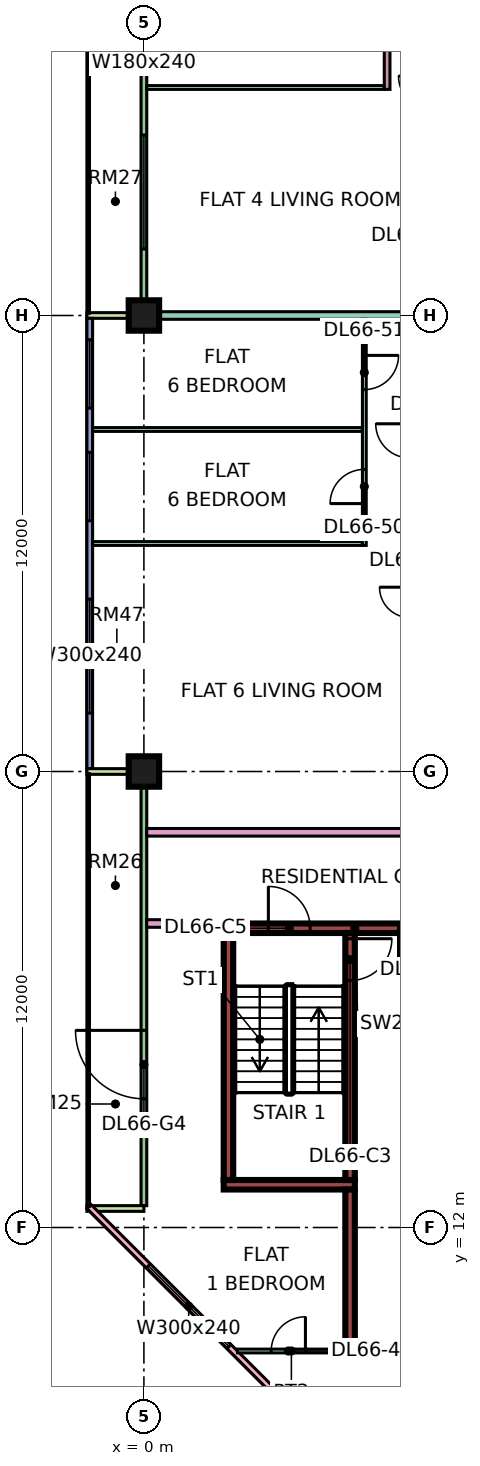
"""IFC4 building model, lengths in metres.
Left out: names, types, materials, properties, quantities, classifications, styles, units other than length and angle.
Written with IfcOpenShell. Run it as: python <this file> out.ifc"""

import sys

from ifc_helpers import new_model, si_unit, direction, frame, frame_2d, origin, origin_2d, place, context, subcontext, project, spatial, rectangle, extrude, element, fill, save


model = new_model("IFC4")
c1 = context("Model", 3, precision=1e-05, world=origin(), true_north=direction((0.0, 1.0)))
c2 = subcontext(c1, "Body", "Model", "MODEL_VIEW")
j1 = project(units=[si_unit("LENGTHUNIT", "METRE"), si_unit("PLANEANGLEUNIT", "RADIAN")], contexts=[c1])
p1 = place(None, origin())
s1 = spatial("IfcSite", under=j1, at=p1, CompositionType="ELEMENT")
p2 = place(p1, origin())
s2 = spatial("IfcBuilding", under=s1, at=p2, CompositionType="ELEMENT")
p3 = place(p2, frame((0.0, 0.0, 284.65)))
s3 = spatial("IfcBuildingStorey", under=s2, at=p3, CompositionType="ELEMENT", Elevation=284.65)
p4 = place(p3, frame((0.0, 24.0, 0.0), z_axis=(0.0, 0.0, 1.0), x_axis=(1.0, 0.0, 0.0)))
e1 = element("IfcColumn", 1, at=p4, inside=s3, PredefinedType="COLUMN", context=c2, shape_type="SweptSolid", body=[
    extrude(rectangle(XDim=0.8, YDim=0.8, at=origin_2d()), origin(), (0.0, 0.0, 1.0), 3.75),
])
p5 = place(p3, frame((0.0, 36.0, 0.0), z_axis=(0.0, 0.0, 1.0), x_axis=(1.0, 0.0, 0.0)))
e2 = element("IfcColumn", 2, at=p5, inside=s3, PredefinedType="COLUMN", context=c2, shape_type="SweptSolid", body=[
    extrude(rectangle(XDim=0.8, YDim=0.8, at=origin_2d()), origin(), (0.0, 0.0, 1.0), 3.75),
])
p6 = place(p3, frame((2.1, 19.875, 0.0), z_axis=(0.0, 0.0, 1.0), x_axis=(1.0, 0.0, 0.0)))
e3 = element("IfcWall", 3, at=p6, inside=s3, PredefinedType="SHEAR", context=c2, shape_type="SweptSolid", body=[
    extrude(rectangle(XDim=6.9, YDim=0.25, at=frame_2d((3.45, 0.0))), origin(), (0.0, 0.0, 1.0), 3.75),
])
p7 = place(p6, frame((1.175, 0.0, 0.0)))
e4 = element("IfcOpeningElement", 4, at=p7, cuts=e3, PredefinedType="OPENING", context=c2, shape_type="SweptSolid", body=[
    extrude(rectangle(XDim=1.1, YDim=2.2, at=frame_2d((0.55, 1.1))), frame((0.0, 0.135, 0.0), z_axis=(0.0, -1.0, 0.0), x_axis=(1.0, 0.0, 0.0)), (0.0, 0.0, 1.0), 0.27),
])
p8 = place(p6, frame((4.6, 0.0, 0.0)))
e5 = element("IfcOpeningElement", 5, at=p8, cuts=e3, PredefinedType="OPENING", context=c2, shape_type="SweptSolid", body=[
    extrude(rectangle(XDim=1.2, YDim=2.2, at=frame_2d((0.6, 1.1))), frame((0.0, 0.135, 0.0), z_axis=(0.0, -1.0, 0.0), x_axis=(1.0, 0.0, 0.0)), (0.0, 0.0, 1.0), 0.27),
])
p9 = place(p3, frame((2.1, 13.125, 0.0), z_axis=(0.0, 0.0, 1.0), x_axis=(1.0, 0.0, 0.0)))
e6 = element("IfcWall", 6, at=p9, inside=s3, PredefinedType="SHEAR", context=c2, shape_type="SweptSolid", body=[
    extrude(rectangle(XDim=3.45, YDim=0.25, at=frame_2d((1.725, 0.0))), origin(), (0.0, 0.0, 1.0), 3.75),
])
p10 = place(p3, frame((2.225, 13.25, 0.0), z_axis=(0.0, 0.0, 1.0), x_axis=(0.0, 1.0, 0.0)))
e7 = element("IfcWall", 7, at=p10, inside=s3, PredefinedType="SHEAR", context=c2, shape_type="SweptSolid", body=[
    extrude(rectangle(XDim=6.5, YDim=0.25, at=frame_2d((3.25, 0.0))), origin(), (0.0, 0.0, 1.0), 3.75),
])
p11 = place(p3, frame((5.425, 13.25, 0.0), z_axis=(0.0, 0.0, 1.0), x_axis=(0.0, 1.0, 0.0)))
e8 = element("IfcWall", 8, at=p11, inside=s3, PredefinedType="SHEAR", context=c2, shape_type="SweptSolid", body=[
    extrude(rectangle(XDim=6.5, YDim=0.25, at=frame_2d((3.25, 0.0))), origin(), (0.0, 0.0, 1.0), 3.75),
])
p12 = place(p11, frame((5.25, 0.0, 0.0)))
e9 = element("IfcOpeningElement", 9, at=p12, cuts=e8, PredefinedType="OPENING", context=c2, shape_type="SweptSolid", body=[
    extrude(rectangle(XDim=1.1, YDim=2.2, at=frame_2d((0.55, 1.1))), frame((0.0, 0.135, 0.0), z_axis=(0.0, -1.0, 0.0), x_axis=(1.0, 0.0, 0.0)), (0.0, 0.0, 1.0), 0.27),
])
p13 = place(p3, frame((5.3, 8.875, 0.0), z_axis=(0.0, 0.0, 1.0), x_axis=(1.0, 0.0, 0.0)))
e10 = element("IfcWall", 10, at=p13, inside=s3, PredefinedType="SHEAR", context=c2, shape_type="SweptSolid", body=[
    extrude(rectangle(XDim=3.7, YDim=0.25, at=frame_2d((1.85, 0.0))), origin(), (0.0, 0.0, 1.0), 3.75),
])
p14 = place(p3, frame((5.425, 9.0, 0.0), z_axis=(0.0, 0.0, 1.0), x_axis=(0.0, 1.0, 0.0)))
e11 = element("IfcWall", 11, at=p14, inside=s3, PredefinedType="SHEAR", context=c2, shape_type="SweptSolid", body=[
    extrude(rectangle(XDim=4.0, YDim=0.25, at=frame_2d((2.0, 0.0))), origin(), (0.0, 0.0, 1.0), 3.75),
])
p15 = place(p3, frame((0.0, 47.925, 0.0), z_axis=(0.0, 0.0, 1.0), x_axis=(0.0, -1.0, 0.0)))
e12 = element("IfcWall", 12, at=p15, inside=s3, PredefinedType="SOLIDWALL", context=c2, shape_type="SweptSolid", body=[
    extrude(rectangle(XDim=11.85, YDim=0.15, at=frame_2d((5.925, 0.0))), origin(), (0.0, 0.0, 1.0), 3.35),
])
p16 = place(p15, frame((0.613, 0.0, 0.0)))
e13 = element("IfcOpeningElement", 13, at=p16, cuts=e12, PredefinedType="OPENING", context=c2, shape_type="SweptSolid", body=[
    extrude(rectangle(XDim=1.2, YDim=2.4, at=frame_2d((0.6, 1.2))), frame((0.0, 0.085, 0.0), z_axis=(0.0, -1.0, 0.0), x_axis=(1.0, 0.0, 0.0)), (0.0, 0.0, 1.0), 0.17),
])
p17 = place(p15, frame((3.775, 0.0, 0.45)))
e14 = element("IfcOpeningElement", 14, at=p17, cuts=e12, PredefinedType="OPENING", context=c2, shape_type="SweptSolid", body=[
    extrude(rectangle(XDim=1.8, YDim=2.4, at=frame_2d((0.9, 1.2))), frame((0.0, 0.085, 0.0), z_axis=(0.0, -1.0, 0.0), x_axis=(1.0, 0.0, 0.0)), (0.0, 0.0, 1.0), 0.17),
])
p18 = place(p15, frame((7.175, 0.0, 0.45)))
e15 = element("IfcOpeningElement", 15, at=p18, cuts=e12, PredefinedType="OPENING", context=c2, shape_type="SweptSolid", body=[
    extrude(rectangle(XDim=3.0, YDim=2.4, at=frame_2d((1.5, 1.2))), frame((0.0, 0.085, 0.0), z_axis=(0.0, -1.0, 0.0), x_axis=(1.0, 0.0, 0.0)), (0.0, 0.0, 1.0), 0.17),
])
p19 = place(p3, frame((-1.5, 36.0, 0.0), z_axis=(0.0, 0.0, 1.0), x_axis=(1.0, 0.0, 0.0)))
e16 = element("IfcWall", 16, at=p19, inside=s3, PredefinedType="SOLIDWALL", context=c2, shape_type="SweptSolid", body=[
    extrude(rectangle(XDim=1.5, YDim=0.15, at=frame_2d((0.75, 0.0))), origin(), (0.0, 0.0, 1.0), 3.35),
])
p20 = place(p3, frame((-1.425, 35.925, 0.0), z_axis=(0.0, 0.0, 1.0), x_axis=(0.0, -1.0, 0.0)))
e17 = element("IfcWall", 17, at=p20, inside=s3, PredefinedType="SOLIDWALL", context=c2, shape_type="SweptSolid", body=[
    extrude(rectangle(XDim=11.85, YDim=0.15, at=frame_2d((5.925, 0.0))), origin(), (0.0, 0.0, 1.0), 3.35),
])
p21 = place(p20, frame((0.562, 0.0, 0.45)))
e18 = element("IfcOpeningElement", 18, at=p21, cuts=e17, PredefinedType="OPENING", context=c2, shape_type="SweptSolid", body=[
    extrude(rectangle(XDim=1.8, YDim=2.4, at=frame_2d((0.9, 1.2))), frame((0.0, 0.085, 0.0), z_axis=(0.0, -1.0, 0.0), x_axis=(1.0, 0.0, 0.0)), (0.0, 0.0, 1.0), 0.17),
])
p22 = place(p20, frame((3.525, 0.0, 0.45)))
e19 = element("IfcOpeningElement", 19, at=p22, cuts=e17, PredefinedType="OPENING", context=c2, shape_type="SweptSolid", body=[
    extrude(rectangle(XDim=1.8, YDim=2.4, at=frame_2d((0.9, 1.2))), frame((0.0, 0.085, 0.0), z_axis=(0.0, -1.0, 0.0), x_axis=(1.0, 0.0, 0.0)), (0.0, 0.0, 1.0), 0.17),
])
p23 = place(p20, frame((7.387, 0.0, 0.45)))
e20 = element("IfcOpeningElement", 20, at=p23, cuts=e17, PredefinedType="OPENING", context=c2, shape_type="SweptSolid", body=[
    extrude(rectangle(XDim=3.0, YDim=2.4, at=frame_2d((1.5, 1.2))), frame((0.0, 0.085, 0.0), z_axis=(0.0, -1.0, 0.0), x_axis=(1.0, 0.0, 0.0)), (0.0, 0.0, 1.0), 0.17),
])
p24 = place(p3, frame((0.0, 23.925, 0.0), z_axis=(0.0, 0.0, 1.0), x_axis=(0.0, -1.0, 0.0)))
e21 = element("IfcWall", 21, at=p24, inside=s3, PredefinedType="SOLIDWALL", context=c2, shape_type="SweptSolid", body=[
    extrude(rectangle(XDim=11.35, YDim=0.15, at=frame_2d((5.675, 0.0))), origin(), (0.0, 0.0, 1.0), 3.35),
])
p25 = place(p24, frame((6.738, 0.0, 0.0)))
e22 = element("IfcOpeningElement", 22, at=p25, cuts=e21, PredefinedType="OPENING", context=c2, shape_type="SweptSolid", body=[
    extrude(rectangle(XDim=1.8, YDim=2.4, at=frame_2d((0.9, 1.2))), frame((0.0, 0.085, 0.0), z_axis=(0.0, -1.0, 0.0), x_axis=(1.0, 0.0, 0.0)), (0.0, 0.0, 1.0), 0.17),
])
for number, where, z_axis, x_axis in (
    (23, (-1.5, 24.0, 0.0), (0.0, 0.0, 1.0), (1.0, 0.0, 0.0)),
    (24, (-1.5, 12.5, 0.0), (0.0, 0.0, 1.0), (1.0, 0.0, 0.0)),
):
    element("IfcWall", number, at=place(p3, frame(where, z_axis=z_axis, x_axis=x_axis)), inside=s3, PredefinedType="SOLIDWALL", context=c2, shape_type="SweptSolid", body=[
        extrude(rectangle(XDim=1.5, YDim=0.15, at=frame_2d((0.75, 0.0))), origin(), (0.0, 0.0, 1.0), 3.35),
    ])
p26 = place(p3, frame((-1.447, 12.553, 0.0), z_axis=(0.0, 0.0, 1.0), x_axis=(0.707106781187, -0.707106781187, 0.0)))
e25 = element("IfcWall", 25, at=p26, inside=s3, PredefinedType="SOLIDWALL", context=c2, shape_type="SweptSolid", body=[
    extrude(rectangle(XDim=19.799, YDim=0.15, at=frame_2d((9.899, 0.0))), origin(), (0.0, 0.0, 1.0), 3.35),
])
p27 = place(p26, frame((2.212, 0.0, 0.45)))
e26 = element("IfcOpeningElement", 26, at=p27, cuts=e25, PredefinedType="OPENING", context=c2, shape_type="SweptSolid", body=[
    extrude(rectangle(XDim=3.0, YDim=2.4, at=frame_2d((1.5, 1.2))), frame((0.0, 0.085, 0.0), z_axis=(0.0, -1.0, 0.0), x_axis=(1.0, 0.0, 0.0)), (0.0, 0.0, 1.0), 0.17),
])
p28 = place(p26, frame((10.216, 0.0, 0.45)))
e27 = element("IfcOpeningElement", 27, at=p28, cuts=e25, PredefinedType="OPENING", context=c2, shape_type="SweptSolid", body=[
    extrude(rectangle(XDim=3.0, YDim=2.4, at=frame_2d((1.5, 1.2))), frame((0.0, 0.085, 0.0), z_axis=(0.0, -1.0, 0.0), x_axis=(1.0, 0.0, 0.0)), (0.0, 0.0, 1.0), 0.17),
])
p29 = place(p3, frame((-1.351, 33.0, 0.0), z_axis=(0.0, 0.0, 1.0), x_axis=(1.0, 0.0, 0.0)))
e28 = element("IfcWall", 28, at=p29, inside=s3, PredefinedType="PARTITIONING", context=c2, shape_type="SweptSolid", body=[
    extrude(rectangle(XDim=7.101, YDim=0.1, at=frame_2d((3.551, 0.0))), origin(), (0.0, 0.0, 1.0), 3.35),
])
p30 = place(p3, frame((-1.35, 30.0, 0.0), z_axis=(0.0, 0.0, 1.0), x_axis=(1.0, 0.0, 0.0)))
e29 = element("IfcWall", 29, at=p30, inside=s3, PredefinedType="PARTITIONING", context=c2, shape_type="SweptSolid", body=[
    extrude(rectangle(XDim=7.1, YDim=0.1, at=frame_2d((3.55, 0.0))), origin(), (0.0, 0.0, 1.0), 3.35),
])
e30 = element("IfcWall", 30, at=p5, inside=s3, PredefinedType="PARTITIONING", context=c2, shape_type="SweptSolid", body=[
    extrude(rectangle(XDim=12.3, YDim=0.2, at=frame_2d((6.15, 0.0))), origin(), (0.0, 0.0, 1.0), 3.35),
])
p31 = place(p3, frame((0.074, 20.0, 0.0), z_axis=(0.0, 0.0, 1.0), x_axis=(1.0, 0.0, 0.0)))
e31 = element("IfcWall", 31, at=p31, inside=s3, PredefinedType="PARTITIONING", context=c2, shape_type="SweptSolid", body=[
    extrude(rectangle(XDim=2.026, YDim=0.2, at=frame_2d((1.013, 0.0))), origin(), (0.0, 0.0, 1.0), 3.35),
])
p32 = place(p3, frame((0.074, 22.4, 0.0), z_axis=(0.0, 0.0, 1.0), x_axis=(1.0, 0.0, 0.0)))
e32 = element("IfcWall", 32, at=p32, inside=s3, PredefinedType="PARTITIONING", context=c2, shape_type="SweptSolid", body=[
    extrude(rectangle(XDim=12.226, YDim=0.2, at=frame_2d((6.113, 0.0))), origin(), (0.0, 0.0, 1.0), 3.35),
])
p33 = place(p3, frame((0.074, 42.0, 0.0), z_axis=(0.0, 0.0, 1.0), x_axis=(1.0, 0.0, 0.0)))
e33 = element("IfcWall", 33, at=p33, inside=s3, PredefinedType="PARTITIONING", context=c2, shape_type="SweptSolid", body=[
    extrude(rectangle(XDim=6.251, YDim=0.1, at=frame_2d((3.125, 0.0))), origin(), (0.0, 0.0, 1.0), 3.35),
])
p34 = place(p3, frame((2.461, 8.75, 0.0), z_axis=(0.0, 0.0, 1.0), x_axis=(1.0, 0.0, 0.0)))
e34 = element("IfcWall", 34, at=p34, inside=s3, PredefinedType="PARTITIONING", context=c2, shape_type="SweptSolid", body=[
    extrude(rectangle(XDim=2.839, YDim=0.1, at=frame_2d((1.419, 0.0))), origin(), (0.0, 0.0, 1.0), 3.35),
])
p35 = place(p34, frame((0.889, 0.0, 0.0)))
e35 = element("IfcOpeningElement", 35, at=p35, cuts=e34, PredefinedType="OPENING", context=c2, shape_type="SweptSolid", body=[
    extrude(rectangle(XDim=0.9, YDim=2.1, at=frame_2d((0.45, 1.05))), frame((0.0, 0.06, 0.0), z_axis=(0.0, -1.0, 0.0), x_axis=(1.0, 0.0, 0.0)), (0.0, 0.0, 1.0), 0.12),
])
p36 = place(p3, frame((5.8, 29.95, 0.0), z_axis=(0.0, 0.0, 1.0), x_axis=(0.0, 1.0, 0.0)))
e36 = element("IfcWall", 36, at=p36, inside=s3, PredefinedType="PARTITIONING", context=c2, shape_type="SweptSolid", body=[
    extrude(rectangle(XDim=5.95, YDim=0.1, at=frame_2d((2.975, 0.0))), origin(), (0.0, 0.0, 1.0), 3.35),
])
p37 = place(p36, frame((1.1, 0.0, 0.0)))
e37 = element("IfcOpeningElement", 37, at=p37, cuts=e36, PredefinedType="OPENING", context=c2, shape_type="SweptSolid", body=[
    extrude(rectangle(XDim=0.9, YDim=2.1, at=frame_2d((0.45, 1.05))), frame((0.0, 0.06, 0.0), z_axis=(0.0, -1.0, 0.0), x_axis=(1.0, 0.0, 0.0)), (0.0, 0.0, 1.0), 0.12),
])
p38 = place(p36, frame((4.1, 0.0, 0.0)))
e38 = element("IfcOpeningElement", 38, at=p38, cuts=e36, PredefinedType="OPENING", context=c2, shape_type="SweptSolid", body=[
    extrude(rectangle(XDim=0.9, YDim=2.1, at=frame_2d((0.45, 1.05))), frame((0.0, 0.06, 0.0), z_axis=(0.0, -1.0, 0.0), x_axis=(1.0, 0.0, 0.0)), (0.0, 0.0, 1.0), 0.12),
])
p39 = place(p3, frame((6.4, 41.95, 0.0), z_axis=(0.0, 0.0, 1.0), x_axis=(0.0, 1.0, 0.0)))
e39 = element("IfcWall", 39, at=p39, inside=s3, PredefinedType="PARTITIONING", context=c2, shape_type="SweptSolid", body=[
    extrude(rectangle(XDim=13.4, YDim=0.15, at=frame_2d((6.7, 0.0))), origin(), (0.0, 0.0, 1.0), 3.35),
])
p40 = place(p39, frame((1.1, 0.0, 0.0)))
e40 = element("IfcOpeningElement", 40, at=p40, cuts=e39, PredefinedType="OPENING", context=c2, shape_type="SweptSolid", body=[
    extrude(rectangle(XDim=0.9, YDim=2.1, at=frame_2d((0.45, 1.05))), frame((0.0, 0.085, 0.0), z_axis=(0.0, -1.0, 0.0), x_axis=(1.0, 0.0, 0.0)), (0.0, 0.0, 1.0), 0.17),
])
p41 = place(p39, frame((4.1, 0.0, 0.0)))
e41 = element("IfcOpeningElement", 41, at=p41, cuts=e39, PredefinedType="OPENING", context=c2, shape_type="SweptSolid", body=[
    extrude(rectangle(XDim=0.9, YDim=2.1, at=frame_2d((0.45, 1.05))), frame((0.0, 0.085, 0.0), z_axis=(0.0, -1.0, 0.0), x_axis=(1.0, 0.0, 0.0)), (0.0, 0.0, 1.0), 0.17),
])
p42 = place(p39, frame((10.95, 0.0, 0.0)))
e42 = element("IfcOpeningElement", 42, at=p42, cuts=e39, PredefinedType="OPENING", context=c2, shape_type="SweptSolid", body=[
    extrude(rectangle(XDim=0.8, YDim=2.1, at=frame_2d((0.4, 1.05))), frame((0.0, 0.085, 0.0), z_axis=(0.0, -1.0, 0.0), x_axis=(1.0, 0.0, 0.0)), (0.0, 0.0, 1.0), 0.17),
])
p43 = place(p39, frame((6.7, 0.0, 0.0)))
e43 = element("IfcOpeningElement", 43, at=p43, cuts=e39, PredefinedType="OPENING", context=c2, shape_type="SweptSolid", body=[
    extrude(rectangle(XDim=1.6, YDim=2.1, at=frame_2d((0.8, 1.05))), frame((0.0, 0.085, 0.0), z_axis=(0.0, -1.0, 0.0), x_axis=(1.0, 0.0, 0.0)), (0.0, 0.0, 1.0), 0.17),
])
p44 = place(p17, origin())
e44 = element("IfcWindow", 44, at=p44, inside=s3, PartitioningType="SINGLE_PANEL", PredefinedType="WINDOW", context=c2, shape_type="SweptSolid", body=[
    extrude(rectangle(XDim=1.8, YDim=2.4, at=frame_2d((0.9, 1.2))), frame((0.0, 0.03, 0.0), z_axis=(0.0, -1.0, 0.0), x_axis=(1.0, 0.0, 0.0)), (0.0, 0.0, 1.0), 0.06),
])
fill(e14, e44)
p45 = place(p18, origin())
e45 = element("IfcWindow", 45, at=p45, inside=s3, PartitioningType="SINGLE_PANEL", PredefinedType="WINDOW", context=c2, shape_type="SweptSolid", body=[
    extrude(rectangle(XDim=3.0, YDim=2.4, at=frame_2d((1.5, 1.2))), frame((0.0, 0.03, 0.0), z_axis=(0.0, -1.0, 0.0), x_axis=(1.0, 0.0, 0.0)), (0.0, 0.0, 1.0), 0.06),
])
fill(e15, e45)
p46 = place(p21, origin())
e46 = element("IfcWindow", 46, at=p46, inside=s3, PartitioningType="SINGLE_PANEL", PredefinedType="WINDOW", context=c2, shape_type="SweptSolid", body=[
    extrude(rectangle(XDim=1.8, YDim=2.4, at=frame_2d((0.9, 1.2))), frame((0.0, 0.03, 0.0), z_axis=(0.0, -1.0, 0.0), x_axis=(1.0, 0.0, 0.0)), (0.0, 0.0, 1.0), 0.06),
])
fill(e18, e46)
p47 = place(p22, origin())
e47 = element("IfcWindow", 47, at=p47, inside=s3, PartitioningType="SINGLE_PANEL", PredefinedType="WINDOW", context=c2, shape_type="SweptSolid", body=[
    extrude(rectangle(XDim=1.8, YDim=2.4, at=frame_2d((0.9, 1.2))), frame((0.0, 0.03, 0.0), z_axis=(0.0, -1.0, 0.0), x_axis=(1.0, 0.0, 0.0)), (0.0, 0.0, 1.0), 0.06),
])
fill(e19, e47)
p48 = place(p23, origin())
e48 = element("IfcWindow", 48, at=p48, inside=s3, PartitioningType="SINGLE_PANEL", PredefinedType="WINDOW", context=c2, shape_type="SweptSolid", body=[
    extrude(rectangle(XDim=3.0, YDim=2.4, at=frame_2d((1.5, 1.2))), frame((0.0, 0.03, 0.0), z_axis=(0.0, -1.0, 0.0), x_axis=(1.0, 0.0, 0.0)), (0.0, 0.0, 1.0), 0.06),
])
fill(e20, e48)
p49 = place(p25, frame((1.8, 0.0, 0.0), z_axis=(0.0, 0.0, 1.0), x_axis=(-1.0, 0.0, 0.0)))
e49 = element("IfcDoor", 49, at=p49, inside=s3, OperationType="DOUBLE_DOOR_SINGLE_SWING", PredefinedType="DOOR", context=c2, shape_type="SweptSolid", body=[
    extrude(rectangle(XDim=1.8, YDim=2.4, at=frame_2d((0.9, 1.2))), frame((0.0, 0.025, 0.0), z_axis=(0.0, -1.0, 0.0), x_axis=(1.0, 0.0, 0.0)), (0.0, 0.0, 1.0), 0.05),
])
fill(e22, e49)
p50 = place(p27, origin())
e50 = element("IfcWindow", 50, at=p50, inside=s3, PartitioningType="SINGLE_PANEL", PredefinedType="WINDOW", context=c2, shape_type="SweptSolid", body=[
    extrude(rectangle(XDim=3.0, YDim=2.4, at=frame_2d((1.5, 1.2))), frame((0.0, 0.03, 0.0), z_axis=(0.0, -1.0, 0.0), x_axis=(1.0, 0.0, 0.0)), (0.0, 0.0, 1.0), 0.06),
])
fill(e26, e50)
p51 = place(p12, origin())
e51 = element("IfcDoor", 51, at=p51, inside=s3, OperationType="SINGLE_SWING_RIGHT", PredefinedType="DOOR", context=c2, shape_type="SweptSolid", body=[
    extrude(rectangle(XDim=1.1, YDim=2.2, at=frame_2d((0.55, 1.1))), frame((0.0, 0.025, 0.0), z_axis=(0.0, -1.0, 0.0), x_axis=(1.0, 0.0, 0.0)), (0.0, 0.0, 1.0), 0.05),
])
fill(e9, e51)
p52 = place(p7, origin())
e52 = element("IfcDoor", 52, at=p52, inside=s3, OperationType="SINGLE_SWING_LEFT", PredefinedType="DOOR", context=c2, shape_type="SweptSolid", body=[
    extrude(rectangle(XDim=1.1, YDim=2.2, at=frame_2d((0.55, 1.1))), frame((0.0, 0.025, 0.0), z_axis=(0.0, -1.0, 0.0), x_axis=(1.0, 0.0, 0.0)), (0.0, 0.0, 1.0), 0.05),
])
fill(e4, e52)
p53 = place(p8, frame((1.2, 0.0, 0.0), z_axis=(0.0, 0.0, 1.0), x_axis=(-1.0, 0.0, 0.0)))
e53 = element("IfcDoor", 53, at=p53, inside=s3, OperationType="SINGLE_SWING_LEFT", PredefinedType="DOOR", context=c2, shape_type="SweptSolid", body=[
    extrude(rectangle(XDim=1.2, YDim=2.2, at=frame_2d((0.6, 1.1))), frame((0.0, 0.025, 0.0), z_axis=(0.0, -1.0, 0.0), x_axis=(1.0, 0.0, 0.0)), (0.0, 0.0, 1.0), 0.05),
])
fill(e5, e53)
p54 = place(p35, frame((0.9, 0.0, 0.0), z_axis=(0.0, 0.0, 1.0), x_axis=(-1.0, 0.0, 0.0)))
e54 = element("IfcDoor", 54, at=p54, inside=s3, OperationType="SINGLE_SWING_RIGHT", PredefinedType="DOOR", context=c2, shape_type="SweptSolid", body=[
    extrude(rectangle(XDim=0.9, YDim=2.1, at=frame_2d((0.45, 1.05))), frame((0.0, 0.025, 0.0), z_axis=(0.0, -1.0, 0.0), x_axis=(1.0, 0.0, 0.0)), (0.0, 0.0, 1.0), 0.05),
])
fill(e35, e54)
p55 = place(p37, origin())
e55 = element("IfcDoor", 55, at=p55, inside=s3, OperationType="SINGLE_SWING_LEFT", PredefinedType="DOOR", context=c2, shape_type="SweptSolid", body=[
    extrude(rectangle(XDim=0.9, YDim=2.1, at=frame_2d((0.45, 1.05))), frame((0.0, 0.025, 0.0), z_axis=(0.0, -1.0, 0.0), x_axis=(1.0, 0.0, 0.0)), (0.0, 0.0, 1.0), 0.05),
])
fill(e37, e55)
p56 = place(p38, origin())
e56 = element("IfcDoor", 56, at=p56, inside=s3, OperationType="SINGLE_SWING_RIGHT", PredefinedType="DOOR", context=c2, shape_type="SweptSolid", body=[
    extrude(rectangle(XDim=0.9, YDim=2.1, at=frame_2d((0.45, 1.05))), frame((0.0, 0.025, 0.0), z_axis=(0.0, -1.0, 0.0), x_axis=(1.0, 0.0, 0.0)), (0.0, 0.0, 1.0), 0.05),
])
fill(e38, e56)
save(model, sys.argv[1])
